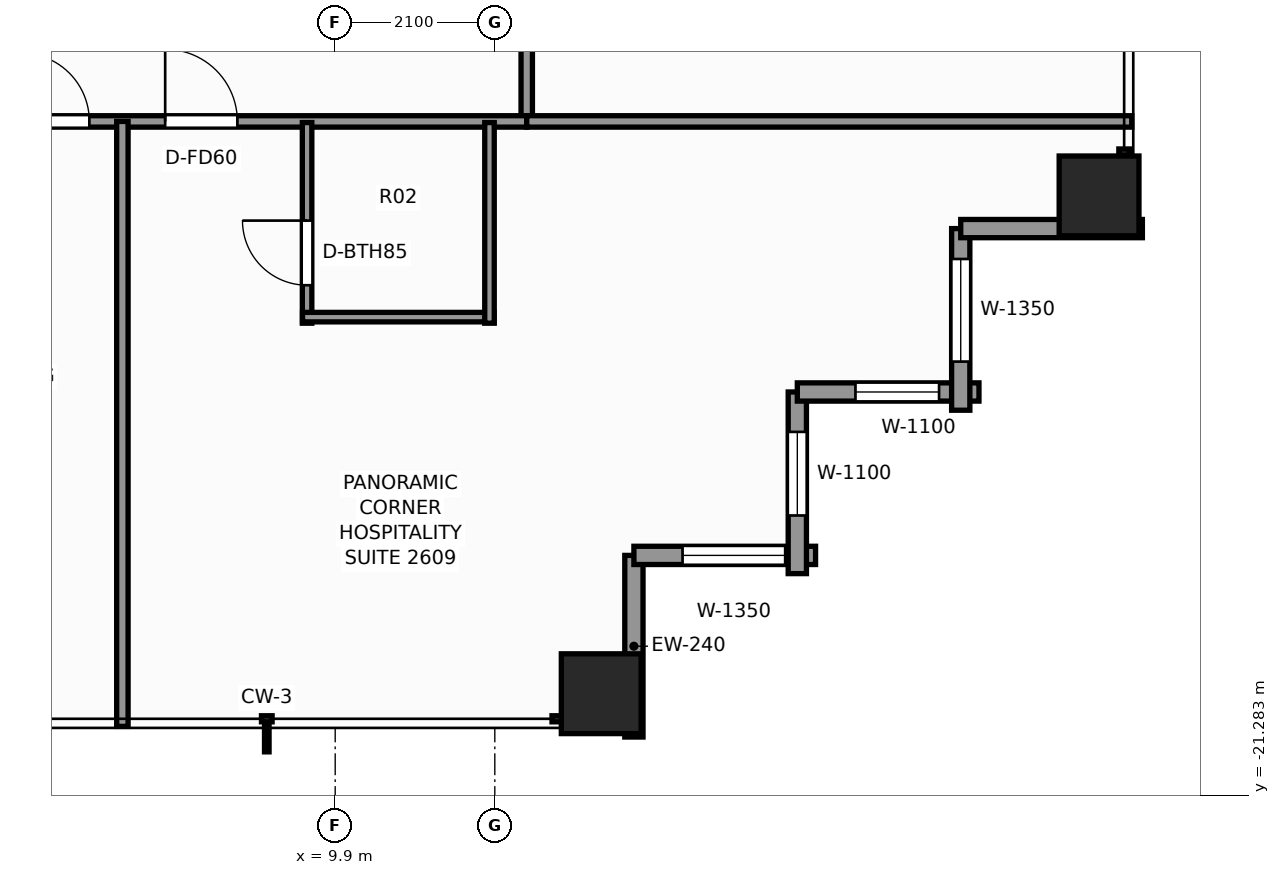
"""IFC4 building model, lengths in metres.
Left out: names, types, materials, properties, quantities, classifications, styles, units other than length and angle.
Written with IfcOpenShell. Run it as: python <this file> out.ifc"""

import sys

from ifc_helpers import new_model, si_unit, direction, frame, frame_2d, origin, origin_2d, place, context, subcontext, project, spatial, rectangle, extrude, element, fill, save


model = new_model("IFC4")
c1 = context("Model", 3, precision=1e-05, world=origin(), true_north=direction((0.0, 1.0)))
c2 = subcontext(c1, "Body", "Model", "MODEL_VIEW")
j1 = project(units=[si_unit("LENGTHUNIT", "METRE"), si_unit("PLANEANGLEUNIT", "RADIAN")], contexts=[c1])
p1 = place(None, origin())
s1 = spatial("IfcSite", under=j1, at=p1, CompositionType="ELEMENT")
p2 = place(p1, origin())
s2 = spatial("IfcBuilding", under=s1, at=p2, CompositionType="ELEMENT")
p3 = place(p2, frame((0.0, 0.0, 92.0)))
s3 = spatial("IfcBuildingStorey", under=s2, at=p3, CompositionType="ELEMENT", Elevation=92.0)
for number, where, z_axis, x_axis in (
    (1, (13.4, -19.95, 0.0), (0.0, 0.0, 1.0), (1.0, 0.0, 0.0)),
    (2, (19.95, -13.4, 0.0), (0.0, 0.0, 1.0), (1.0, 0.0, 0.0)),
):
    element("IfcColumn", number, at=place(p3, frame(where, z_axis=z_axis, x_axis=x_axis)), inside=s3, PredefinedType="COLUMN", context=c2, shape_type="SweptSolid", body=[
        extrude(rectangle(XDim=1.05, YDim=1.05, at=origin_2d()), origin(), (0.0, 0.0, 1.0), 3.3),
    ])
p4 = place(p3, frame((13.83, -18.13, 0.0), z_axis=(0.0, 0.0, 1.0), x_axis=(0.0, -1.0, 0.0)))
e3 = element("IfcWall", 3, at=p4, inside=s3, PredefinedType="STANDARD", context=c2, shape_type="SweptSolid", body=[
    extrude(rectangle(XDim=2.39, YDim=0.24, at=frame_2d((1.195, 0.0))), origin(), (0.0, 0.0, 1.0), 2.459),
])
p5 = place(p3, frame((16.22, -18.13, 0.0), z_axis=(0.0, 0.0, 1.0), x_axis=(-1.0, 0.0, 0.0)))
e4 = element("IfcWall", 4, at=p5, inside=s3, PredefinedType="STANDARD", context=c2, shape_type="SweptSolid", body=[
    extrude(rectangle(XDim=2.39, YDim=0.24, at=frame_2d((1.195, 0.0))), origin(), (0.0, 0.0, 1.0), 2.459),
])
p6 = place(p5, frame((0.4, 0.0, 0.65)))
e5 = element("IfcOpeningElement", 5, at=p6, cuts=e4, PredefinedType="OPENING", context=c2, shape_type="SweptSolid", body=[
    extrude(rectangle(XDim=1.35, YDim=1.55, at=frame_2d((0.675, 0.775))), frame((0.0, 0.13, 0.0), z_axis=(0.0, -1.0, 0.0), x_axis=(1.0, 0.0, 0.0)), (0.0, 0.0, 1.0), 0.26),
])
p7 = place(p3, frame((15.98, -15.98, 0.0), z_axis=(0.0, 0.0, 1.0), x_axis=(0.0, -1.0, 0.0)))
e6 = element("IfcWall", 6, at=p7, inside=s3, PredefinedType="STANDARD", context=c2, shape_type="SweptSolid", body=[
    extrude(rectangle(XDim=2.39, YDim=0.24, at=frame_2d((1.195, 0.0))), origin(), (0.0, 0.0, 1.0), 2.459),
])
p8 = place(p7, frame((0.525, 0.0, 0.65)))
e7 = element("IfcOpeningElement", 7, at=p8, cuts=e6, PredefinedType="OPENING", context=c2, shape_type="SweptSolid", body=[
    extrude(rectangle(XDim=1.1, YDim=1.45, at=frame_2d((0.55, 0.725))), frame((0.0, 0.13, 0.0), z_axis=(0.0, -1.0, 0.0), x_axis=(1.0, 0.0, 0.0)), (0.0, 0.0, 1.0), 0.26),
])
p9 = place(p3, frame((18.37, -15.98, 0.0), z_axis=(0.0, 0.0, 1.0), x_axis=(-1.0, 0.0, 0.0)))
e8 = element("IfcWall", 8, at=p9, inside=s3, PredefinedType="STANDARD", context=c2, shape_type="SweptSolid", body=[
    extrude(rectangle(XDim=2.39, YDim=0.24, at=frame_2d((1.195, 0.0))), origin(), (0.0, 0.0, 1.0), 2.459),
])
p10 = place(p9, frame((0.525, 0.0, 0.65)))
e9 = element("IfcOpeningElement", 9, at=p10, cuts=e8, PredefinedType="OPENING", context=c2, shape_type="SweptSolid", body=[
    extrude(rectangle(XDim=1.1, YDim=1.45, at=frame_2d((0.55, 0.725))), frame((0.0, 0.13, 0.0), z_axis=(0.0, -1.0, 0.0), x_axis=(1.0, 0.0, 0.0)), (0.0, 0.0, 1.0), 0.26),
])
p11 = place(p3, frame((18.13, -13.83, 0.0), z_axis=(0.0, 0.0, 1.0), x_axis=(0.0, -1.0, 0.0)))
e10 = element("IfcWall", 10, at=p11, inside=s3, PredefinedType="STANDARD", context=c2, shape_type="SweptSolid", body=[
    extrude(rectangle(XDim=2.39, YDim=0.24, at=frame_2d((1.195, 0.0))), origin(), (0.0, 0.0, 1.0), 2.459),
])
p12 = place(p11, frame((0.4, 0.0, 0.65)))
e11 = element("IfcOpeningElement", 11, at=p12, cuts=e10, PredefinedType="OPENING", context=c2, shape_type="SweptSolid", body=[
    extrude(rectangle(XDim=1.35, YDim=1.55, at=frame_2d((0.675, 0.775))), frame((0.0, 0.13, 0.0), z_axis=(0.0, -1.0, 0.0), x_axis=(1.0, 0.0, 0.0)), (0.0, 0.0, 1.0), 0.26),
])
p13 = place(p3, frame((20.52, -13.83, 0.0), z_axis=(0.0, 0.0, 1.0), x_axis=(-1.0, 0.0, 0.0)))
e12 = element("IfcWall", 12, at=p13, inside=s3, PredefinedType="STANDARD", context=c2, shape_type="SweptSolid", body=[
    extrude(rectangle(XDim=2.39, YDim=0.24, at=frame_2d((1.195, 0.0))), origin(), (0.0, 0.0, 1.0), 2.459),
])
p14 = place(p3, frame((12.42, -12.42, 0.0), z_axis=(0.0, 0.0, 1.0), x_axis=(0.0, 1.0, 0.0)))
e13 = element("IfcWall", 13, at=p14, inside=s3, PredefinedType="PARTITIONING", context=c2, shape_type="SweptSolid", body=[
    extrude(rectangle(XDim=24.84, YDim=0.15, at=frame_2d((12.42, 0.0))), origin(), (0.0, 0.0, 1.0), 2.292),
])
p15 = place(p14, frame((4.435, 0.0, 0.0)))
e14 = element("IfcOpeningElement", 14, at=p15, cuts=e13, PredefinedType="OPENING", context=c2, shape_type="SweptSolid", body=[
    extrude(rectangle(XDim=0.9, YDim=2.06, at=frame_2d((0.45, 1.03))), frame((0.0, 0.085, 0.0), z_axis=(0.0, -1.0, 0.0), x_axis=(1.0, 0.0, 0.0)), (0.0, 0.0, 1.0), 0.17),
])
p16 = place(p14, frame((19.505, 0.0, 0.0)))
e15 = element("IfcOpeningElement", 15, at=p16, cuts=e13, PredefinedType="OPENING", context=c2, shape_type="SweptSolid", body=[
    extrude(rectangle(XDim=0.9, YDim=2.06, at=frame_2d((0.45, 1.03))), frame((0.0, 0.085, 0.0), z_axis=(0.0, -1.0, 0.0), x_axis=(1.0, 0.0, 0.0)), (0.0, 0.0, 1.0), 0.17),
])
p17 = place(p3, frame((-3.65, -12.42, 0.0), z_axis=(0.0, 0.0, 1.0), x_axis=(1.0, 0.0, 0.0)))
e16 = element("IfcWall", 16, at=p17, inside=s3, PredefinedType="PARTITIONING", context=c2, shape_type="SweptSolid", body=[
    extrude(rectangle(XDim=16.07, YDim=0.15, at=frame_2d((8.035, 0.0))), origin(), (0.0, 0.0, 1.0), 2.292),
])
p18 = place(p17, frame((0.889, 0.0, 0.0)))
e17 = element("IfcOpeningElement", 17, at=p18, cuts=e16, PredefinedType="OPENING", context=c2, shape_type="SweptSolid", body=[
    extrude(rectangle(XDim=0.9, YDim=2.06, at=frame_2d((0.45, 1.03))), frame((0.0, 0.085, 0.0), z_axis=(0.0, -1.0, 0.0), x_axis=(1.0, 0.0, 0.0)), (0.0, 0.0, 1.0), 0.17),
])
p19 = place(p17, frame((4.722, 0.0, 0.0)))
e18 = element("IfcOpeningElement", 18, at=p19, cuts=e16, PredefinedType="OPENING", context=c2, shape_type="SweptSolid", body=[
    extrude(rectangle(XDim=0.95, YDim=2.06, at=frame_2d((0.475, 1.03))), frame((0.0, 0.085, 0.0), z_axis=(0.0, -1.0, 0.0), x_axis=(1.0, 0.0, 0.0)), (0.0, 0.0, 1.0), 0.17),
])
p20 = place(p17, frame((9.415, 0.0, 0.0)))
e19 = element("IfcOpeningElement", 19, at=p20, cuts=e16, PredefinedType="OPENING", context=c2, shape_type="SweptSolid", body=[
    extrude(rectangle(XDim=0.9, YDim=2.06, at=frame_2d((0.45, 1.03))), frame((0.0, 0.085, 0.0), z_axis=(0.0, -1.0, 0.0), x_axis=(1.0, 0.0, 0.0)), (0.0, 0.0, 1.0), 0.17),
])
p21 = place(p17, frame((11.313, 0.0, 0.0)))
e20 = element("IfcOpeningElement", 20, at=p21, cuts=e16, PredefinedType="OPENING", context=c2, shape_type="SweptSolid", body=[
    extrude(rectangle(XDim=0.95, YDim=2.06, at=frame_2d((0.475, 1.03))), frame((0.0, 0.085, 0.0), z_axis=(0.0, -1.0, 0.0), x_axis=(1.0, 0.0, 0.0)), (0.0, 0.0, 1.0), 0.17),
])
p22 = place(p3, frame((12.42, -12.42, 0.0), z_axis=(0.0, 0.0, 1.0), x_axis=(1.0, 0.0, 0.0)))
e21 = element("IfcWall", 21, at=p22, inside=s3, PredefinedType="PARTITIONING", context=c2, shape_type="SweptSolid", body=[
    extrude(rectangle(XDim=7.96, YDim=0.15, at=frame_2d((3.98, 0.0))), origin(), (0.0, 0.0, 1.0), 2.292),
])
p23 = place(p3, frame((7.1, -20.38, 0.0), z_axis=(0.0, 0.0, 1.0), x_axis=(0.0, 1.0, 0.0)))
e22 = element("IfcWall", 22, at=p23, inside=s3, PredefinedType="PARTITIONING", context=c2, shape_type="SweptSolid", body=[
    extrude(rectangle(XDim=7.96, YDim=0.15, at=frame_2d((3.98, 0.0))), origin(), (0.0, 0.0, 1.0), 2.449),
])
p24 = place(p3, frame((9.53, -15.075, 0.0), z_axis=(0.0, 0.0, 1.0), x_axis=(0.0, 1.0, 0.0)))
e23 = element("IfcWall", 23, at=p24, inside=s3, PredefinedType="PARTITIONING", context=c2, shape_type="SweptSolid", body=[
    extrude(rectangle(XDim=2.64, YDim=0.125, at=frame_2d((1.32, 0.0))), origin(), (0.0, 0.0, 1.0), 3.08),
])
p25 = place(p24, frame((0.5, 0.0, 0.0)))
e24 = element("IfcOpeningElement", 24, at=p25, cuts=e23, PredefinedType="OPENING", context=c2, shape_type="SweptSolid", body=[
    extrude(rectangle(XDim=0.85, YDim=2.03, at=frame_2d((0.425, 1.015))), frame((0.0, 0.073, 0.0), z_axis=(0.0, -1.0, 0.0), x_axis=(1.0, 0.0, 0.0)), (0.0, 0.0, 1.0), 0.145),
])
p26 = place(p3, frame((9.47, -14.995, 0.0), z_axis=(0.0, 0.0, 1.0), x_axis=(1.0, 0.0, 0.0)))
e25 = element("IfcWall", 25, at=p26, inside=s3, PredefinedType="PARTITIONING", context=c2, shape_type="SweptSolid", body=[
    extrude(rectangle(XDim=2.52, YDim=0.125, at=frame_2d((1.26, 0.0))), origin(), (0.0, 0.0, 1.0), 2.292),
])
p27 = place(p3, frame((11.93, -15.075, 0.0), z_axis=(0.0, 0.0, 1.0), x_axis=(0.0, 1.0, 0.0)))
e26 = element("IfcWall", 26, at=p27, inside=s3, PredefinedType="PARTITIONING", context=c2, shape_type="SweptSolid", body=[
    extrude(rectangle(XDim=2.64, YDim=0.125, at=frame_2d((1.32, 0.0))), origin(), (0.0, 0.0, 1.0), 2.292),
])
p28 = place(p6, origin())
e27 = element("IfcWindow", 27, at=p28, inside=s3, PartitioningType="SINGLE_PANEL", PredefinedType="WINDOW", context=c2, shape_type="SweptSolid", body=[
    extrude(rectangle(XDim=1.35, YDim=1.55, at=frame_2d((0.675, 0.775))), frame((0.0, 0.03, 0.0), z_axis=(0.0, -1.0, 0.0), x_axis=(1.0, 0.0, 0.0)), (0.0, 0.0, 1.0), 0.06),
])
fill(e5, e27)
p29 = place(p8, origin())
e28 = element("IfcWindow", 28, at=p29, inside=s3, PartitioningType="SINGLE_PANEL", PredefinedType="WINDOW", context=c2, shape_type="SweptSolid", body=[
    extrude(rectangle(XDim=1.1, YDim=1.45, at=frame_2d((0.55, 0.725))), frame((0.0, 0.03, 0.0), z_axis=(0.0, -1.0, 0.0), x_axis=(1.0, 0.0, 0.0)), (0.0, 0.0, 1.0), 0.06),
])
fill(e7, e28)
p30 = place(p10, origin())
e29 = element("IfcWindow", 29, at=p30, inside=s3, PartitioningType="SINGLE_PANEL", PredefinedType="WINDOW", context=c2, shape_type="SweptSolid", body=[
    extrude(rectangle(XDim=1.1, YDim=1.45, at=frame_2d((0.55, 0.725))), frame((0.0, 0.03, 0.0), z_axis=(0.0, -1.0, 0.0), x_axis=(1.0, 0.0, 0.0)), (0.0, 0.0, 1.0), 0.06),
])
fill(e9, e29)
p31 = place(p12, origin())
e30 = element("IfcWindow", 30, at=p31, inside=s3, PartitioningType="SINGLE_PANEL", PredefinedType="WINDOW", context=c2, shape_type="SweptSolid", body=[
    extrude(rectangle(XDim=1.35, YDim=1.55, at=frame_2d((0.675, 0.775))), frame((0.0, 0.03, 0.0), z_axis=(0.0, -1.0, 0.0), x_axis=(1.0, 0.0, 0.0)), (0.0, 0.0, 1.0), 0.06),
])
fill(e11, e30)
p32 = place(p20, origin())
e31 = element("IfcDoor", 31, at=p32, inside=s3, OperationType="SINGLE_SWING_LEFT", PredefinedType="DOOR", context=c2, shape_type="SweptSolid", body=[
    extrude(rectangle(XDim=0.9, YDim=2.06, at=frame_2d((0.45, 1.03))), frame((0.0, 0.025, 0.0), z_axis=(0.0, -1.0, 0.0), x_axis=(1.0, 0.0, 0.0)), (0.0, 0.0, 1.0), 0.05),
])
fill(e19, e31)
p33 = place(p25, origin())
e32 = element("IfcDoor", 32, at=p33, inside=s3, OperationType="SINGLE_SWING_RIGHT", PredefinedType="DOOR", context=c2, shape_type="SweptSolid", body=[
    extrude(rectangle(XDim=0.85, YDim=2.03, at=frame_2d((0.425, 1.015))), frame((0.0, 0.025, 0.0), z_axis=(0.0, -1.0, 0.0), x_axis=(1.0, 0.0, 0.0)), (0.0, 0.0, 1.0), 0.05),
])
fill(e24, e32)
p34 = place(p21, origin())
e33 = element("IfcDoor", 33, at=p34, inside=s3, OperationType="SINGLE_SWING_LEFT", PredefinedType="DOOR", context=c2, shape_type="SweptSolid", body=[
    extrude(rectangle(XDim=0.95, YDim=2.06, at=frame_2d((0.475, 1.03))), frame((0.0, 0.025, 0.0), z_axis=(0.0, -1.0, 0.0), x_axis=(1.0, 0.0, 0.0)), (0.0, 0.0, 1.0), 0.05),
])
fill(e20, e33)
save(model, sys.argv[1])
